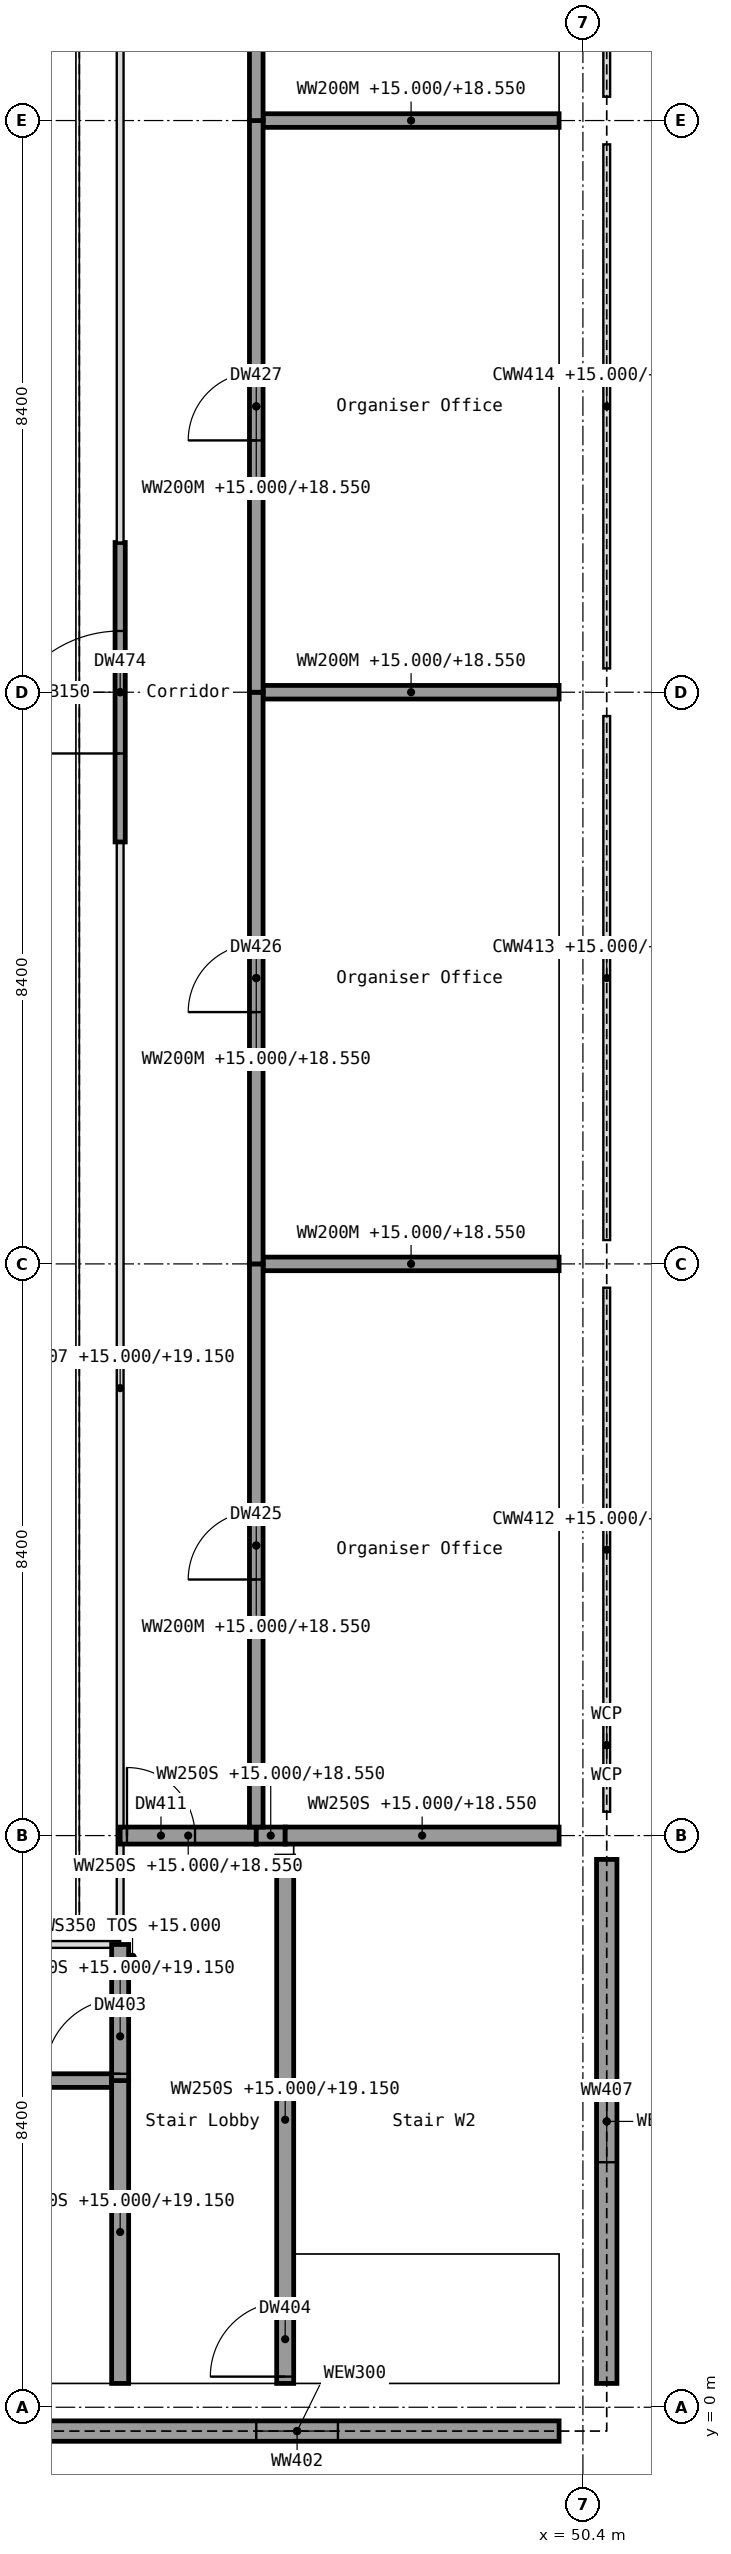
"""IFC4 building model, lengths in metres.
Left out: names, types, materials, properties, quantities, classifications, styles, units other than length and angle.
Written with IfcOpenShell. Run it as: python <this file> out.ifc"""

import sys

from ifc_helpers import new_model, si_unit, direction, frame, frame_2d, origin, origin_2d, place, context, subcontext, project, spatial, rectangle, extrude, element, fill, save


model = new_model("IFC4")
c1 = context("Model", 3, precision=1e-05, world=origin(), true_north=direction((0.0, 1.0)))
c2 = subcontext(c1, "Body", "Model", "MODEL_VIEW")
j1 = project(units=[si_unit("LENGTHUNIT", "METRE"), si_unit("PLANEANGLEUNIT", "RADIAN")], contexts=[c1])
p1 = place(None, origin())
s1 = spatial("IfcSite", under=j1, at=p1, CompositionType="ELEMENT")
p2 = place(p1, origin())
s2 = spatial("IfcBuilding", under=s1, at=p2, CompositionType="ELEMENT")
p3 = place(p2, frame((0.0, 0.0, 15.0)))
s3 = spatial("IfcBuildingStorey", under=s2, at=p3, CompositionType="ELEMENT", Elevation=15.0)
for number, where, z_axis, x_axis in (
    (1, (50.4, 0.0, 0.0), (0.0, 0.0, 1.0), (1.0, 0.0, 0.0)),
    (2, (50.4, 8.4, 0.0), (0.0, 0.0, 1.0), (1.0, 0.0, 0.0)),
    (3, (50.4, 16.8, 0.0), (0.0, 0.0, 1.0), (1.0, 0.0, 0.0)),
    (4, (50.4, 25.2, 0.0), (0.0, 0.0, 1.0), (1.0, 0.0, 0.0)),
    (5, (50.4, 33.6, 0.0), (0.0, 0.0, 1.0), (1.0, 0.0, 0.0)),
):
    element("IfcColumn", number, at=place(p3, frame(where, z_axis=z_axis, x_axis=x_axis)), inside=s3, PredefinedType="COLUMN", context=c2, shape_type="SweptSolid", body=[
        extrude(rectangle(XDim=0.7, YDim=0.7, at=origin_2d()), origin(), (0.0, 0.0, 1.0), 4.5),
    ])
p4 = place(p3, frame((42.35, -0.35, 0.0), z_axis=(0.0, 0.0, 1.0), x_axis=(1.0, 0.0, 0.0)))
e6 = element("IfcWall", 6, at=p4, inside=s3, PredefinedType="SOLIDWALL", context=c2, shape_type="SweptSolid", body=[
    extrude(rectangle(XDim=7.7, YDim=0.3, at=frame_2d((3.85, 0.0))), origin(), (0.0, 0.0, 1.0), 3.8),
])
p5 = place(p4, frame((3.25, 0.0, 1.0)))
e7 = element("IfcOpeningElement", 7, at=p5, cuts=e6, PredefinedType="OPENING", context=c2, shape_type="SweptSolid", body=[
    extrude(rectangle(XDim=1.2, YDim=1.5, at=frame_2d((0.6, 0.75))), frame((0.0, 0.15, 0.0), z_axis=(0.0, -1.0, 0.0), x_axis=(1.0, 0.0, 0.0)), (0.0, 0.0, 1.0), 0.3),
])
p6 = place(p3, frame((50.75, 0.35, 0.0), z_axis=(0.0, 0.0, 1.0), x_axis=(0.0, 1.0, 0.0)))
e8 = element("IfcWall", 8, at=p6, inside=s3, PredefinedType="SOLIDWALL", context=c2, shape_type="SweptSolid", body=[
    extrude(rectangle(XDim=7.7, YDim=0.3, at=frame_2d((3.85, 0.0))), origin(), (0.0, 0.0, 1.0), 3.8),
])
p7 = place(p6, frame((3.25, 0.0, 1.0)))
e9 = element("IfcOpeningElement", 9, at=p7, cuts=e8, PredefinedType="OPENING", context=c2, shape_type="SweptSolid", body=[
    extrude(rectangle(XDim=1.2, YDim=1.5, at=frame_2d((0.6, 0.75))), frame((0.0, 0.15, 0.0), z_axis=(0.0, -1.0, 0.0), x_axis=(1.0, 0.0, 0.0)), (0.0, 0.0, 1.0), 0.3),
])
p8 = place(p3, frame((43.6, 23.0, 0.0), z_axis=(0.0, 0.0, 1.0), x_axis=(0.0, 1.0, 0.0)))
e10 = element("IfcWall", 10, at=p8, inside=s3, PredefinedType="SOLIDWALL", context=c2, shape_type="SweptSolid", body=[
    extrude(rectangle(XDim=4.4, YDim=0.15, at=frame_2d((2.2, 0.0))), origin(), (0.0, 0.0, 1.0), 4.15),
])
p9 = place(p8, frame((1.3, 0.0, 0.0)))
e11 = element("IfcOpeningElement", 11, at=p9, cuts=e10, PredefinedType="OPENING", context=c2, shape_type="SweptSolid", body=[
    extrude(rectangle(XDim=1.8, YDim=2.4, at=frame_2d((0.9, 1.2))), frame((0.0, 0.075, 0.0), z_axis=(0.0, -1.0, 0.0), x_axis=(1.0, 0.0, 0.0)), (0.0, 0.0, 1.0), 0.15),
])
p10 = place(p3, frame((33.6, 4.8, 0.0), z_axis=(0.0, 0.0, 1.0), x_axis=(1.0, 0.0, 0.0)))
e12 = element("IfcWall", 12, at=p10, inside=s3, PredefinedType="SOLIDWALL", context=c2, shape_type="SweptSolid", body=[
    extrude(rectangle(XDim=9.875, YDim=0.2, at=frame_2d((4.938, 0.0))), origin(), (0.0, 0.0, 1.0), 3.55),
])
p11 = place(p10, frame((4.438, 0.0, 0.0)))
e13 = element("IfcOpeningElement", 13, at=p11, cuts=e12, PredefinedType="OPENING", context=c2, shape_type="SweptSolid", body=[
    extrude(rectangle(XDim=1.0, YDim=2.1, at=frame_2d((0.5, 1.05))), frame((0.0, 0.1, 0.0), z_axis=(0.0, -1.0, 0.0), x_axis=(1.0, 0.0, 0.0)), (0.0, 0.0, 1.0), 0.2),
])
p12 = place(p3, frame((43.6, 8.4, 0.0), z_axis=(0.0, 0.0, 1.0), x_axis=(1.0, 0.0, 0.0)))
e14 = element("IfcWall", 14, at=p12, inside=s3, PredefinedType="SHEAR", context=c2, shape_type="SweptSolid", body=[
    extrude(rectangle(XDim=2.0, YDim=0.25, at=frame_2d((1.0, 0.0))), origin(), (0.0, 0.0, 1.0), 3.55),
])
p13 = place(p12, frame((0.1, 0.0, 0.0)))
e15 = element("IfcOpeningElement", 15, at=p13, cuts=e14, PredefinedType="OPENING", context=c2, shape_type="SweptSolid", body=[
    extrude(rectangle(XDim=1.0, YDim=2.1, at=frame_2d((0.5, 1.05))), frame((0.0, 0.125, 0.0), z_axis=(0.0, -1.0, 0.0), x_axis=(1.0, 0.0, 0.0)), (0.0, 0.0, 1.0), 0.25),
])
p14 = place(p3, frame((45.6, 8.4, 0.0), z_axis=(0.0, 0.0, 1.0), x_axis=(1.0, 0.0, 0.0)))
e16 = element("IfcWall", 16, at=p14, inside=s3, PredefinedType="SHEAR", context=c2, shape_type="SweptSolid", body=[
    extrude(rectangle(XDim=0.425, YDim=0.25, at=frame_2d((0.212, 0.0))), origin(), (0.0, 0.0, 1.0), 3.55),
])
p15 = place(p3, frame((46.025, 8.4, 0.0), z_axis=(0.0, 0.0, 1.0), x_axis=(1.0, 0.0, 0.0)))
e17 = element("IfcWall", 17, at=p15, inside=s3, PredefinedType="SHEAR", context=c2, shape_type="SweptSolid", body=[
    extrude(rectangle(XDim=4.025, YDim=0.25, at=frame_2d((2.013, 0.0))), origin(), (0.0, 0.0, 1.0), 3.55),
])
for number, where, z_axis, x_axis in (
    (18, (45.7, 16.8, 0.0), (0.0, 0.0, 1.0), (1.0, 0.0, 0.0)),
    (19, (45.7, 25.2, 0.0), (0.0, 0.0, 1.0), (1.0, 0.0, 0.0)),
    (20, (45.7, 33.6, 0.0), (0.0, 0.0, 1.0), (1.0, 0.0, 0.0)),
):
    element("IfcWall", number, at=place(p3, frame(where, z_axis=z_axis, x_axis=x_axis)), inside=s3, PredefinedType="PARTITIONING", context=c2, shape_type="SweptSolid", body=[
        extrude(rectangle(XDim=4.35, YDim=0.2, at=frame_2d((2.175, 0.0))), origin(), (0.0, 0.0, 1.0), 3.55),
    ])
p16 = place(p3, frame((43.6, 0.35, 0.0), z_axis=(0.0, 0.0, 1.0), x_axis=(0.0, 1.0, 0.0)))
e21 = element("IfcWall", 21, at=p16, inside=s3, PredefinedType="SHEAR", context=c2, shape_type="SweptSolid", body=[
    extrude(rectangle(XDim=4.45, YDim=0.25, at=frame_2d((2.225, 0.0))), origin(), (0.0, 0.0, 1.0), 4.15),
])
p17 = place(p3, frame((43.6, 4.8, 0.0), z_axis=(0.0, 0.0, 1.0), x_axis=(0.0, 1.0, 0.0)))
e22 = element("IfcWall", 22, at=p17, inside=s3, PredefinedType="SHEAR", context=c2, shape_type="SweptSolid", body=[
    extrude(rectangle(XDim=2.0, YDim=0.25, at=frame_2d((1.0, 0.0))), origin(), (0.0, 0.0, 1.0), 4.15),
])
p18 = place(p17, frame((0.1, 0.0, 0.0)))
e23 = element("IfcOpeningElement", 23, at=p18, cuts=e22, PredefinedType="OPENING", context=c2, shape_type="SweptSolid", body=[
    extrude(rectangle(XDim=1.1, YDim=2.1, at=frame_2d((0.55, 1.05))), frame((0.0, 0.125, 0.0), z_axis=(0.0, -1.0, 0.0), x_axis=(1.0, 0.0, 0.0)), (0.0, 0.0, 1.0), 0.25),
])
p19 = place(p3, frame((45.6, 8.525, 0.0), z_axis=(0.0, 0.0, 1.0), x_axis=(0.0, 1.0, 0.0)))
e24 = element("IfcWall", 24, at=p19, inside=s3, PredefinedType="PARTITIONING", context=c2, shape_type="SweptSolid", body=[
    extrude(rectangle(XDim=8.275, YDim=0.2, at=frame_2d((4.138, 0.0))), origin(), (0.0, 0.0, 1.0), 3.55),
])
p20 = place(p19, frame((3.637, 0.0, 0.0)))
e25 = element("IfcOpeningElement", 25, at=p20, cuts=e24, PredefinedType="OPENING", context=c2, shape_type="SweptSolid", body=[
    extrude(rectangle(XDim=1.0, YDim=2.1, at=frame_2d((0.5, 1.05))), frame((0.0, 0.1, 0.0), z_axis=(0.0, -1.0, 0.0), x_axis=(1.0, 0.0, 0.0)), (0.0, 0.0, 1.0), 0.2),
])
p21 = place(p3, frame((45.6, 16.8, 0.0), z_axis=(0.0, 0.0, 1.0), x_axis=(0.0, 1.0, 0.0)))
e26 = element("IfcWall", 26, at=p21, inside=s3, PredefinedType="PARTITIONING", context=c2, shape_type="SweptSolid", body=[
    extrude(rectangle(XDim=8.4, YDim=0.2, at=frame_2d((4.2, 0.0))), origin(), (0.0, 0.0, 1.0), 3.55),
])
p22 = place(p21, frame((3.7, 0.0, 0.0)))
e27 = element("IfcOpeningElement", 27, at=p22, cuts=e26, PredefinedType="OPENING", context=c2, shape_type="SweptSolid", body=[
    extrude(rectangle(XDim=1.0, YDim=2.1, at=frame_2d((0.5, 1.05))), frame((0.0, 0.1, 0.0), z_axis=(0.0, -1.0, 0.0), x_axis=(1.0, 0.0, 0.0)), (0.0, 0.0, 1.0), 0.2),
])
p23 = place(p3, frame((45.6, 25.2, 0.0), z_axis=(0.0, 0.0, 1.0), x_axis=(0.0, 1.0, 0.0)))
e28 = element("IfcWall", 28, at=p23, inside=s3, PredefinedType="PARTITIONING", context=c2, shape_type="SweptSolid", body=[
    extrude(rectangle(XDim=8.4, YDim=0.2, at=frame_2d((4.2, 0.0))), origin(), (0.0, 0.0, 1.0), 3.55),
])
p24 = place(p23, frame((3.7, 0.0, 0.0)))
e29 = element("IfcOpeningElement", 29, at=p24, cuts=e28, PredefinedType="OPENING", context=c2, shape_type="SweptSolid", body=[
    extrude(rectangle(XDim=1.0, YDim=2.1, at=frame_2d((0.5, 1.05))), frame((0.0, 0.1, 0.0), z_axis=(0.0, -1.0, 0.0), x_axis=(1.0, 0.0, 0.0)), (0.0, 0.0, 1.0), 0.2),
])
p25 = place(p3, frame((45.6, 33.6, 0.0), z_axis=(0.0, 0.0, 1.0), x_axis=(0.0, 1.0, 0.0)))
e30 = element("IfcWall", 30, at=p25, inside=s3, PredefinedType="PARTITIONING", context=c2, shape_type="SweptSolid", body=[
    extrude(rectangle(XDim=8.275, YDim=0.2, at=frame_2d((4.137, 0.0))), origin(), (0.0, 0.0, 1.0), 3.55),
])
p26 = place(p25, frame((3.637, 0.0, 0.0)))
e31 = element("IfcOpeningElement", 31, at=p26, cuts=e30, PredefinedType="OPENING", context=c2, shape_type="SweptSolid", body=[
    extrude(rectangle(XDim=1.0, YDim=2.1, at=frame_2d((0.5, 1.05))), frame((0.0, 0.1, 0.0), z_axis=(0.0, -1.0, 0.0), x_axis=(1.0, 0.0, 0.0)), (0.0, 0.0, 1.0), 0.2),
])
p27 = place(p3, frame((46.025, 0.35, 0.0), z_axis=(0.0, 0.0, 1.0), x_axis=(0.0, 1.0, 0.0)))
e32 = element("IfcWall", 32, at=p27, inside=s3, PredefinedType="SHEAR", context=c2, shape_type="SweptSolid", body=[
    extrude(rectangle(XDim=7.75, YDim=0.25, at=frame_2d((3.875, 0.0))), origin(), (0.0, 0.0, 1.0), 4.15),
])
p28 = place(p27, frame((0.1, 0.0, 0.0)))
e33 = element("IfcOpeningElement", 33, at=p28, cuts=e32, PredefinedType="OPENING", context=c2, shape_type="SweptSolid", body=[
    extrude(rectangle(XDim=1.1, YDim=2.1, at=frame_2d((0.55, 1.05))), frame((0.0, 0.125, 0.0), z_axis=(0.0, -1.0, 0.0), x_axis=(1.0, 0.0, 0.0)), (0.0, 0.0, 1.0), 0.25),
])
p29 = place(p5, origin())
e34 = element("IfcWindow", 34, at=p29, inside=s3, PartitioningType="SINGLE_PANEL", PredefinedType="WINDOW", context=c2, shape_type="SweptSolid", body=[
    extrude(rectangle(XDim=1.2, YDim=1.5, at=frame_2d((0.6, 0.75))), frame((0.0, 0.03, 0.0), z_axis=(0.0, -1.0, 0.0), x_axis=(1.0, 0.0, 0.0)), (0.0, 0.0, 1.0), 0.06),
])
fill(e7, e34)
p30 = place(p7, origin())
e35 = element("IfcWindow", 35, at=p30, inside=s3, PartitioningType="SINGLE_PANEL", PredefinedType="WINDOW", context=c2, shape_type="SweptSolid", body=[
    extrude(rectangle(XDim=1.2, YDim=1.5, at=frame_2d((0.6, 0.75))), frame((0.0, 0.03, 0.0), z_axis=(0.0, -1.0, 0.0), x_axis=(1.0, 0.0, 0.0)), (0.0, 0.0, 1.0), 0.06),
])
fill(e9, e35)
p31 = place(p9, origin())
e36 = element("IfcDoor", 36, at=p31, inside=s3, OperationType="DOUBLE_DOOR_DOUBLE_SWING", PredefinedType="DOOR", context=c2, shape_type="SweptSolid", body=[
    extrude(rectangle(XDim=1.8, YDim=2.4, at=frame_2d((0.9, 1.2))), frame((0.0, 0.025, 0.0), z_axis=(0.0, -1.0, 0.0), x_axis=(1.0, 0.0, 0.0)), (0.0, 0.0, 1.0), 0.05),
])
fill(e11, e36)
p32 = place(p18, origin())
e37 = element("IfcDoor", 37, at=p32, inside=s3, OperationType="SINGLE_SWING_LEFT", PredefinedType="DOOR", context=c2, shape_type="SweptSolid", body=[
    extrude(rectangle(XDim=1.1, YDim=2.1, at=frame_2d((0.55, 1.05))), frame((0.0, 0.025, 0.0), z_axis=(0.0, -1.0, 0.0), x_axis=(1.0, 0.0, 0.0)), (0.0, 0.0, 1.0), 0.05),
])
fill(e23, e37)
p33 = place(p28, origin())
e38 = element("IfcDoor", 38, at=p33, inside=s3, OperationType="SINGLE_SWING_LEFT", PredefinedType="DOOR", context=c2, shape_type="SweptSolid", body=[
    extrude(rectangle(XDim=1.1, YDim=2.1, at=frame_2d((0.55, 1.05))), frame((0.0, 0.025, 0.0), z_axis=(0.0, -1.0, 0.0), x_axis=(1.0, 0.0, 0.0)), (0.0, 0.0, 1.0), 0.05),
])
fill(e33, e38)
p34 = place(p13, origin())
e39 = element("IfcDoor", 39, at=p34, inside=s3, OperationType="SINGLE_SWING_LEFT", PredefinedType="DOOR", context=c2, shape_type="SweptSolid", body=[
    extrude(rectangle(XDim=1.0, YDim=2.1, at=frame_2d((0.5, 1.05))), frame((0.0, 0.025, 0.0), z_axis=(0.0, -1.0, 0.0), x_axis=(1.0, 0.0, 0.0)), (0.0, 0.0, 1.0), 0.05),
])
fill(e15, e39)
p35 = place(p20, origin())
e40 = element("IfcDoor", 40, at=p35, inside=s3, OperationType="SINGLE_SWING_LEFT", PredefinedType="DOOR", context=c2, shape_type="SweptSolid", body=[
    extrude(rectangle(XDim=1.0, YDim=2.1, at=frame_2d((0.5, 1.05))), frame((0.0, 0.025, 0.0), z_axis=(0.0, -1.0, 0.0), x_axis=(1.0, 0.0, 0.0)), (0.0, 0.0, 1.0), 0.05),
])
fill(e25, e40)
p36 = place(p22, origin())
e41 = element("IfcDoor", 41, at=p36, inside=s3, OperationType="SINGLE_SWING_LEFT", PredefinedType="DOOR", context=c2, shape_type="SweptSolid", body=[
    extrude(rectangle(XDim=1.0, YDim=2.1, at=frame_2d((0.5, 1.05))), frame((0.0, 0.025, 0.0), z_axis=(0.0, -1.0, 0.0), x_axis=(1.0, 0.0, 0.0)), (0.0, 0.0, 1.0), 0.05),
])
fill(e27, e41)
p37 = place(p24, origin())
e42 = element("IfcDoor", 42, at=p37, inside=s3, OperationType="SINGLE_SWING_LEFT", PredefinedType="DOOR", context=c2, shape_type="SweptSolid", body=[
    extrude(rectangle(XDim=1.0, YDim=2.1, at=frame_2d((0.5, 1.05))), frame((0.0, 0.025, 0.0), z_axis=(0.0, -1.0, 0.0), x_axis=(1.0, 0.0, 0.0)), (0.0, 0.0, 1.0), 0.05),
])
fill(e29, e42)
save(model, sys.argv[1])
